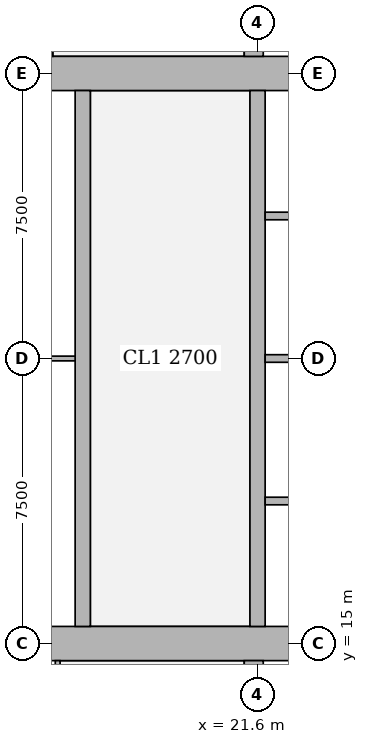
"""IFC4 building model, lengths in metres.
Left out: names, types, materials, properties, quantities, classifications, styles, units other than length and angle.
Written with IfcOpenShell. Run it as: python <this file> out.ifc"""

import sys

from ifc_helpers import new_model, si_unit, direction, frame, frame_2d, origin, place, context, subcontext, project, spatial, rectangle, extrude, element, fill, save


model = new_model("IFC4")
c1 = context("Model", 3, precision=1e-05, world=origin(), true_north=direction((0.0, 1.0)))
c2 = subcontext(c1, "Body", "Model", "MODEL_VIEW")
j1 = project(units=[si_unit("LENGTHUNIT", "METRE"), si_unit("PLANEANGLEUNIT", "RADIAN")], contexts=[c1])
p1 = place(None, origin())
s1 = spatial("IfcSite", under=j1, at=p1, CompositionType="ELEMENT")
p2 = place(p1, origin())
s2 = spatial("IfcBuilding", under=s1, at=p2, CompositionType="ELEMENT")
p3 = place(p2, frame((0.0, 0.0, 193.7)))
s3 = spatial("IfcBuildingStorey", under=s2, at=p3, CompositionType="ELEMENT", Elevation=193.7)
p4 = place(p3, frame((13.95, 15.0, 0.0), z_axis=(0.0, 0.0, 1.0), x_axis=(1.0, 0.0, 0.0)))
e1 = element("IfcWall", 1, at=p4, inside=s3, PredefinedType="SHEAR", context=c2, shape_type="SweptSolid", body=[
    extrude(rectangle(XDim=15.3, YDim=0.9, at=frame_2d((7.65, 0.0))), origin(), (0.0, 0.0, 1.0), 3.75),
])
p5 = place(p4, frame((4.45, 0.0, 0.0)))
e2 = element("IfcOpeningElement", 2, at=p5, cuts=e1, PredefinedType="OPENING", context=c2, shape_type="SweptSolid", body=[
    extrude(rectangle(XDim=1.8, YDim=2.1, at=frame_2d((0.9, 1.05))), frame((0.0, 0.46, 0.0), z_axis=(0.0, -1.0, 0.0), x_axis=(1.0, 0.0, 0.0)), (0.0, 0.0, 1.0), 0.92),
])
p6 = place(p4, frame((10.7, 0.0, 0.0)))
e3 = element("IfcOpeningElement", 3, at=p6, cuts=e1, PredefinedType="OPENING", context=c2, shape_type="SweptSolid", body=[
    extrude(rectangle(XDim=1.1, YDim=2.1, at=frame_2d((0.55, 1.05))), frame((0.0, 0.46, 0.0), z_axis=(0.0, -1.0, 0.0), x_axis=(1.0, 0.0, 0.0)), (0.0, 0.0, 1.0), 0.92),
])
p7 = place(p3, frame((13.95, 30.0, 0.0), z_axis=(0.0, 0.0, 1.0), x_axis=(1.0, 0.0, 0.0)))
e4 = element("IfcWall", 4, at=p7, inside=s3, PredefinedType="SHEAR", context=c2, shape_type="SweptSolid", body=[
    extrude(rectangle(XDim=15.3, YDim=0.9, at=frame_2d((7.65, 0.0))), origin(), (0.0, 0.0, 1.0), 3.75),
])
p8 = place(p7, frame((4.45, 0.0, 0.0)))
e5 = element("IfcOpeningElement", 5, at=p8, cuts=e4, PredefinedType="OPENING", context=c2, shape_type="SweptSolid", body=[
    extrude(rectangle(XDim=1.8, YDim=2.1, at=frame_2d((0.9, 1.05))), frame((0.0, 0.46, 0.0), z_axis=(0.0, -1.0, 0.0), x_axis=(1.0, 0.0, 0.0)), (0.0, 0.0, 1.0), 0.92),
])
p9 = place(p7, frame((10.7, 0.0, 0.0)))
e6 = element("IfcOpeningElement", 6, at=p9, cuts=e4, PredefinedType="OPENING", context=c2, shape_type="SweptSolid", body=[
    extrude(rectangle(XDim=1.1, YDim=2.1, at=frame_2d((0.55, 1.05))), frame((0.0, 0.46, 0.0), z_axis=(0.0, -1.0, 0.0), x_axis=(1.0, 0.0, 0.0)), (0.0, 0.0, 1.0), 0.92),
])
p10 = place(p3, frame((17.0, 15.45, 0.0), z_axis=(0.0, 0.0, 1.0), x_axis=(0.0, 1.0, 0.0)))
e7 = element("IfcWall", 7, at=p10, inside=s3, PredefinedType="SHEAR", context=c2, shape_type="SweptSolid", body=[
    extrude(rectangle(XDim=14.1, YDim=0.4, at=frame_2d((7.05, 0.0))), origin(), (0.0, 0.0, 1.0), 3.75),
])
p11 = place(p10, frame((0.925, 0.0, 0.0)))
e8 = element("IfcOpeningElement", 8, at=p11, cuts=e7, PredefinedType="OPENING", context=c2, shape_type="SweptSolid", body=[
    extrude(rectangle(XDim=1.0, YDim=2.1, at=frame_2d((0.5, 1.05))), frame((0.0, 0.21, 0.0), z_axis=(0.0, -1.0, 0.0), x_axis=(1.0, 0.0, 0.0)), (0.0, 0.0, 1.0), 0.42),
])
p12 = place(p10, frame((4.675, 0.0, 0.0)))
e9 = element("IfcOpeningElement", 9, at=p12, cuts=e7, PredefinedType="OPENING", context=c2, shape_type="SweptSolid", body=[
    extrude(rectangle(XDim=1.0, YDim=2.1, at=frame_2d((0.5, 1.05))), frame((0.0, 0.21, 0.0), z_axis=(0.0, -1.0, 0.0), x_axis=(1.0, 0.0, 0.0)), (0.0, 0.0, 1.0), 0.42),
])
p13 = place(p10, frame((8.425, 0.0, 0.0)))
e10 = element("IfcOpeningElement", 10, at=p13, cuts=e7, PredefinedType="OPENING", context=c2, shape_type="SweptSolid", body=[
    extrude(rectangle(XDim=1.0, YDim=2.1, at=frame_2d((0.5, 1.05))), frame((0.0, 0.21, 0.0), z_axis=(0.0, -1.0, 0.0), x_axis=(1.0, 0.0, 0.0)), (0.0, 0.0, 1.0), 0.42),
])
p14 = place(p10, frame((12.175, 0.0, 0.0)))
e11 = element("IfcOpeningElement", 11, at=p14, cuts=e7, PredefinedType="OPENING", context=c2, shape_type="SweptSolid", body=[
    extrude(rectangle(XDim=1.0, YDim=2.1, at=frame_2d((0.5, 1.05))), frame((0.0, 0.21, 0.0), z_axis=(0.0, -1.0, 0.0), x_axis=(1.0, 0.0, 0.0)), (0.0, 0.0, 1.0), 0.42),
])
p15 = place(p3, frame((21.6, 15.45, 0.0), z_axis=(0.0, 0.0, 1.0), x_axis=(0.0, 1.0, 0.0)))
e12 = element("IfcWall", 12, at=p15, inside=s3, PredefinedType="SHEAR", context=c2, shape_type="SweptSolid", body=[
    extrude(rectangle(XDim=14.1, YDim=0.4, at=frame_2d((7.05, 0.0))), origin(), (0.0, 0.0, 1.0), 3.75),
])
p16 = place(p15, frame((0.875, 0.0, 0.0)))
e13 = element("IfcOpeningElement", 13, at=p16, cuts=e12, PredefinedType="OPENING", context=c2, shape_type="SweptSolid", body=[
    extrude(rectangle(XDim=1.1, YDim=2.1, at=frame_2d((0.55, 1.05))), frame((0.0, 0.21, 0.0), z_axis=(0.0, -1.0, 0.0), x_axis=(1.0, 0.0, 0.0)), (0.0, 0.0, 1.0), 0.42),
])
p17 = place(p15, frame((4.625, 0.0, 0.0)))
e14 = element("IfcOpeningElement", 14, at=p17, cuts=e12, PredefinedType="OPENING", context=c2, shape_type="SweptSolid", body=[
    extrude(rectangle(XDim=1.1, YDim=2.1, at=frame_2d((0.55, 1.05))), frame((0.0, 0.21, 0.0), z_axis=(0.0, -1.0, 0.0), x_axis=(1.0, 0.0, 0.0)), (0.0, 0.0, 1.0), 0.42),
])
p18 = place(p15, frame((8.375, 0.0, 0.0)))
e15 = element("IfcOpeningElement", 15, at=p18, cuts=e12, PredefinedType="OPENING", context=c2, shape_type="SweptSolid", body=[
    extrude(rectangle(XDim=1.1, YDim=2.1, at=frame_2d((0.55, 1.05))), frame((0.0, 0.21, 0.0), z_axis=(0.0, -1.0, 0.0), x_axis=(1.0, 0.0, 0.0)), (0.0, 0.0, 1.0), 0.42),
])
p19 = place(p15, frame((12.125, 0.0, 0.0)))
e16 = element("IfcOpeningElement", 16, at=p19, cuts=e12, PredefinedType="OPENING", context=c2, shape_type="SweptSolid", body=[
    extrude(rectangle(XDim=1.1, YDim=2.1, at=frame_2d((0.55, 1.05))), frame((0.0, 0.21, 0.0), z_axis=(0.0, -1.0, 0.0), x_axis=(1.0, 0.0, 0.0)), (0.0, 0.0, 1.0), 0.42),
])
for number, where, z_axis, x_axis in (
    (17, (21.5, 10.35, 0.0), (0.0, 0.0, 1.0), (0.0, 1.0, 0.0)),
    (18, (21.5, 30.45, 0.0), (0.0, 0.0, 1.0), (0.0, 1.0, 0.0)),
):
    element("IfcWall", number, at=place(p3, frame(where, z_axis=z_axis, x_axis=x_axis)), inside=s3, PredefinedType="SHEAR", context=c2, shape_type="SweptSolid", body=[
        extrude(rectangle(XDim=4.2, YDim=0.5, at=frame_2d((2.1, 0.0))), origin(), (0.0, 0.0, 1.0), 3.75),
    ])
p20 = place(p3, frame((16.34, 10.163, 0.0), z_axis=(0.0, 0.0, 1.0), x_axis=(0.0, 1.0, 0.0)))
e19 = element("IfcWall", 19, at=p20, inside=s3, PredefinedType="PARTITIONING", context=c2, shape_type="SweptSolid", body=[
    extrude(rectangle(XDim=4.387, YDim=0.125, at=frame_2d((2.193, 0.0))), origin(), (0.0, 0.0, 1.0), 3.5),
])
p21 = place(p20, frame((1.637, 0.0, 0.0)))
e20 = element("IfcOpeningElement", 20, at=p21, cuts=e19, PredefinedType="OPENING", context=c2, shape_type="SweptSolid", body=[
    extrude(rectangle(XDim=1.0, YDim=2.1, at=frame_2d((0.5, 1.05))), frame((0.0, 0.073, 0.0), z_axis=(0.0, -1.0, 0.0), x_axis=(1.0, 0.0, 0.0)), (0.0, 0.0, 1.0), 0.145),
])
p22 = place(p3, frame((16.15, 30.45, 0.0), z_axis=(0.0, 0.0, 1.0), x_axis=(0.0, 1.0, 0.0)))
e21 = element("IfcWall", 21, at=p22, inside=s3, PredefinedType="PARTITIONING", context=c2, shape_type="SweptSolid", body=[
    extrude(rectangle(XDim=4.387, YDim=0.125, at=frame_2d((2.193, 0.0))), origin(), (0.0, 0.0, 1.0), 3.5),
])
p23 = place(p22, frame((1.75, 0.0, 0.0)))
e22 = element("IfcOpeningElement", 22, at=p23, cuts=e21, PredefinedType="OPENING", context=c2, shape_type="SweptSolid", body=[
    extrude(rectangle(XDim=1.0, YDim=2.1, at=frame_2d((0.5, 1.05))), frame((0.0, 0.073, 0.0), z_axis=(0.0, -1.0, 0.0), x_axis=(1.0, 0.0, 0.0)), (0.0, 0.0, 1.0), 0.145),
])
p24 = place(p3, frame((14.85, 22.5, 0.0), z_axis=(0.0, 0.0, 1.0), x_axis=(1.0, 0.0, 0.0)))
e23 = element("IfcWall", 23, at=p24, inside=s3, PredefinedType="PARTITIONING", context=c2, shape_type="SweptSolid", body=[
    extrude(rectangle(XDim=1.95, YDim=0.125, at=frame_2d((0.975, 0.0))), origin(), (0.0, 0.0, 1.0), 3.5),
])
for number, where, z_axis, x_axis in (
    (24, (21.8, 18.75, 0.0), (0.0, 0.0, 1.0), (1.0, 0.0, 0.0)),
    (25, (21.8, 22.5, 0.0), (0.0, 0.0, 1.0), (1.0, 0.0, 0.0)),
    (26, (21.8, 26.25, 0.0), (0.0, 0.0, 1.0), (1.0, 0.0, 0.0)),
):
    element("IfcWall", number, at=place(p3, frame(where, z_axis=z_axis, x_axis=x_axis)), inside=s3, PredefinedType="SOLIDWALL", context=c2, shape_type="SweptSolid", body=[
        extrude(rectangle(XDim=2.2, YDim=0.2, at=frame_2d((1.1, 0.0))), origin(), (0.0, 0.0, 1.0), 3.5),
    ])
p25 = place(p11, origin())
e27 = element("IfcDoor", 27, at=p25, inside=s3, OperationType="SINGLE_SWING_LEFT", PredefinedType="DOOR", context=c2, shape_type="SweptSolid", body=[
    extrude(rectangle(XDim=1.0, YDim=2.1, at=frame_2d((0.5, 1.05))), frame((0.0, 0.025, 0.0), z_axis=(0.0, -1.0, 0.0), x_axis=(1.0, 0.0, 0.0)), (0.0, 0.0, 1.0), 0.05),
])
fill(e8, e27)
p26 = place(p12, origin())
e28 = element("IfcDoor", 28, at=p26, inside=s3, OperationType="SINGLE_SWING_RIGHT", PredefinedType="DOOR", context=c2, shape_type="SweptSolid", body=[
    extrude(rectangle(XDim=1.0, YDim=2.1, at=frame_2d((0.5, 1.05))), frame((0.0, 0.025, 0.0), z_axis=(0.0, -1.0, 0.0), x_axis=(1.0, 0.0, 0.0)), (0.0, 0.0, 1.0), 0.05),
])
fill(e9, e28)
p27 = place(p13, origin())
e29 = element("IfcDoor", 29, at=p27, inside=s3, OperationType="SINGLE_SWING_LEFT", PredefinedType="DOOR", context=c2, shape_type="SweptSolid", body=[
    extrude(rectangle(XDim=1.0, YDim=2.1, at=frame_2d((0.5, 1.05))), frame((0.0, 0.025, 0.0), z_axis=(0.0, -1.0, 0.0), x_axis=(1.0, 0.0, 0.0)), (0.0, 0.0, 1.0), 0.05),
])
fill(e10, e29)
p28 = place(p14, origin())
e30 = element("IfcDoor", 30, at=p28, inside=s3, OperationType="SINGLE_SWING_RIGHT", PredefinedType="DOOR", context=c2, shape_type="SweptSolid", body=[
    extrude(rectangle(XDim=1.0, YDim=2.1, at=frame_2d((0.5, 1.05))), frame((0.0, 0.025, 0.0), z_axis=(0.0, -1.0, 0.0), x_axis=(1.0, 0.0, 0.0)), (0.0, 0.0, 1.0), 0.05),
])
fill(e11, e30)
p29 = place(p5, origin())
e31 = element("IfcDoor", 31, at=p29, inside=s3, OperationType="DOUBLE_DOOR_SINGLE_SWING", PredefinedType="DOOR", context=c2, shape_type="SweptSolid", body=[
    extrude(rectangle(XDim=1.8, YDim=2.1, at=frame_2d((0.9, 1.05))), frame((0.0, 0.025, 0.0), z_axis=(0.0, -1.0, 0.0), x_axis=(1.0, 0.0, 0.0)), (0.0, 0.0, 1.0), 0.05),
])
fill(e2, e31)
p30 = place(p8, origin())
e32 = element("IfcDoor", 32, at=p30, inside=s3, OperationType="DOUBLE_DOOR_SINGLE_SWING", PredefinedType="DOOR", context=c2, shape_type="SweptSolid", body=[
    extrude(rectangle(XDim=1.8, YDim=2.1, at=frame_2d((0.9, 1.05))), frame((0.0, 0.025, 0.0), z_axis=(0.0, -1.0, 0.0), x_axis=(1.0, 0.0, 0.0)), (0.0, 0.0, 1.0), 0.05),
])
fill(e5, e32)
p31 = place(p16, origin())
e33 = element("IfcDoor", 33, at=p31, inside=s3, OperationType="DOUBLE_DOOR_SLIDING", PredefinedType="DOOR", context=c2, shape_type="SweptSolid", body=[
    extrude(rectangle(XDim=1.1, YDim=2.1, at=frame_2d((0.55, 1.05))), frame((0.0, 0.025, 0.0), z_axis=(0.0, -1.0, 0.0), x_axis=(1.0, 0.0, 0.0)), (0.0, 0.0, 1.0), 0.05),
])
fill(e13, e33)
p32 = place(p17, origin())
e34 = element("IfcDoor", 34, at=p32, inside=s3, OperationType="DOUBLE_DOOR_SLIDING", PredefinedType="DOOR", context=c2, shape_type="SweptSolid", body=[
    extrude(rectangle(XDim=1.1, YDim=2.1, at=frame_2d((0.55, 1.05))), frame((0.0, 0.025, 0.0), z_axis=(0.0, -1.0, 0.0), x_axis=(1.0, 0.0, 0.0)), (0.0, 0.0, 1.0), 0.05),
])
fill(e14, e34)
p33 = place(p18, origin())
e35 = element("IfcDoor", 35, at=p33, inside=s3, OperationType="DOUBLE_DOOR_SLIDING", PredefinedType="DOOR", context=c2, shape_type="SweptSolid", body=[
    extrude(rectangle(XDim=1.1, YDim=2.1, at=frame_2d((0.55, 1.05))), frame((0.0, 0.025, 0.0), z_axis=(0.0, -1.0, 0.0), x_axis=(1.0, 0.0, 0.0)), (0.0, 0.0, 1.0), 0.05),
])
fill(e15, e35)
p34 = place(p19, origin())
e36 = element("IfcDoor", 36, at=p34, inside=s3, OperationType="DOUBLE_DOOR_SLIDING", PredefinedType="DOOR", context=c2, shape_type="SweptSolid", body=[
    extrude(rectangle(XDim=1.1, YDim=2.1, at=frame_2d((0.55, 1.05))), frame((0.0, 0.025, 0.0), z_axis=(0.0, -1.0, 0.0), x_axis=(1.0, 0.0, 0.0)), (0.0, 0.0, 1.0), 0.05),
])
fill(e16, e36)
save(model, sys.argv[1])
